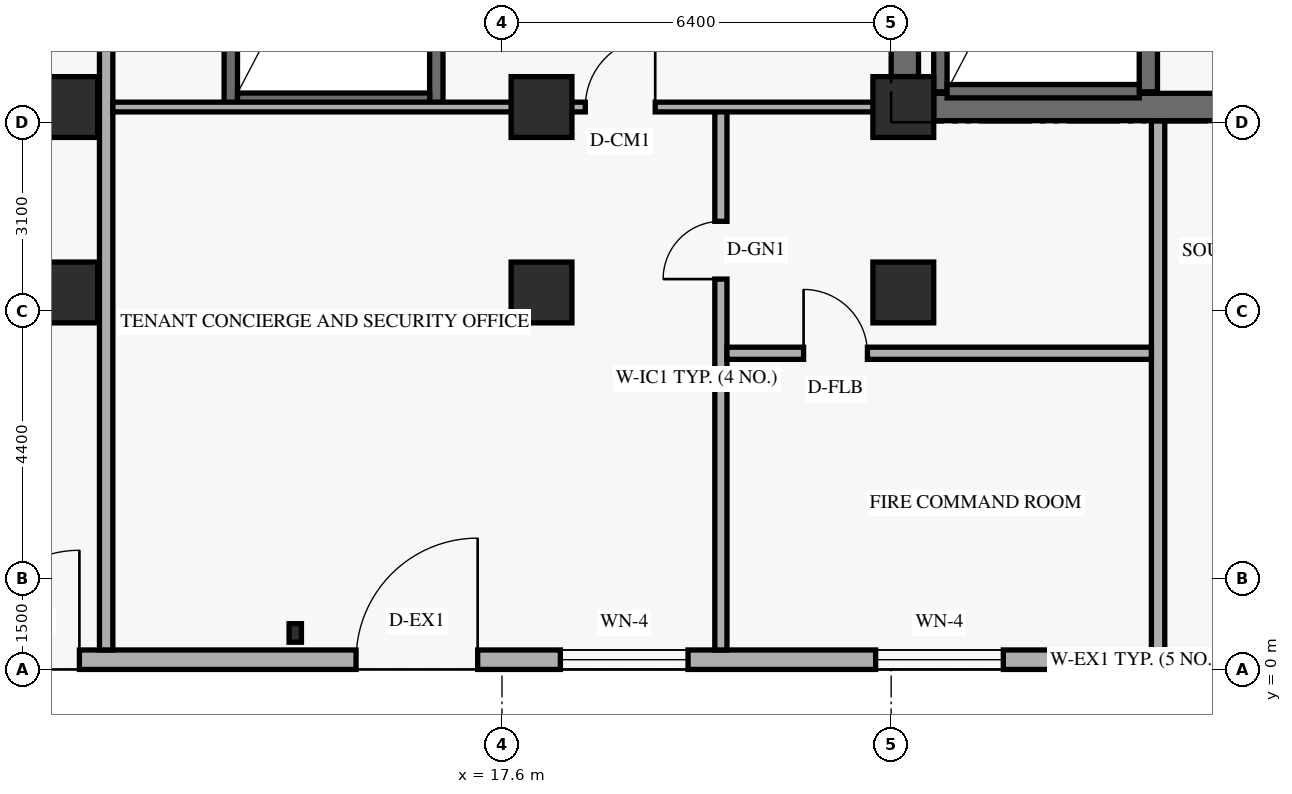
"""IFC4 building model, lengths in metres.
Left out: names, types, materials, properties, quantities, classifications, styles, units other than length and angle.
Written with IfcOpenShell. Run it as: python <this file> out.ifc"""

import sys

from ifc_helpers import new_model, si_unit, direction, frame, frame_2d, origin, origin_2d, place, context, subcontext, project, spatial, rectangle, hollow_rectangle, extrude, element, fill, save


model = new_model("IFC4")
c1 = context("Model", 3, precision=1e-05, world=origin(), true_north=direction((0.0, 1.0)))
c2 = subcontext(c1, "Body", "Model", "MODEL_VIEW")
j1 = project(units=[si_unit("LENGTHUNIT", "METRE"), si_unit("PLANEANGLEUNIT", "RADIAN")], contexts=[c1])
p1 = place(None, origin())
s1 = spatial("IfcSite", under=j1, at=p1, CompositionType="ELEMENT")
p2 = place(p1, origin())
s2 = spatial("IfcBuilding", under=s1, at=p2, CompositionType="ELEMENT")
p3 = place(p2, origin())
s3 = spatial("IfcBuildingStorey", under=s2, at=p3, CompositionType="ELEMENT", Elevation=0.0)
p4 = place(p3, frame((24.225, 9.75, 0.0), z_axis=(0.0, 0.0, 1.0), x_axis=(0.0, 1.0, 0.0)))
e1 = element("IfcWall", 1, at=p4, inside=s3, PredefinedType="SHEAR", context=c2, shape_type="SweptSolid", body=[
    extrude(rectangle(XDim=7.3, YDim=0.45, at=frame_2d((3.65, 0.0))), origin(), (0.0, 0.0, 1.0), 3.539),
])
p5 = place(p3, frame((24.7, 9.25, 0.0), z_axis=(0.0, 0.0, 1.0), x_axis=(1.0, 0.0, 0.0)))
e2 = element("IfcWall", 2, at=p5, inside=s3, PredefinedType="SHEAR", context=c2, shape_type="SweptSolid", body=[
    extrude(rectangle(XDim=10.0, YDim=0.45, at=frame_2d((5.0, 0.0))), origin(), (0.0, 0.0, 1.0), 4.39),
])
p6 = place(p5, frame((5.2, 0.0, 0.0)))
e3 = element("IfcOpeningElement", 3, at=p6, cuts=e2, PredefinedType="OPENING", context=c2, shape_type="SweptSolid", body=[
    extrude(rectangle(XDim=1.1, YDim=2.15, at=frame_2d((0.55, 1.075))), frame((0.0, 0.235, 0.0), z_axis=(0.0, -1.0, 0.0), x_axis=(1.0, 0.0, 0.0)), (0.0, 0.0, 1.0), 0.47),
])
p7 = place(p3, frame((24.81, 9.5, 0.0), z_axis=(0.0, 0.0, 1.0), x_axis=(0.0, 1.0, 0.0)))
e4 = element("IfcWall", 4, at=p7, inside=s3, PredefinedType="SHEAR", context=c2, shape_type="SweptSolid", body=[
    extrude(rectangle(XDim=7.76, YDim=0.22, at=frame_2d((3.88, 0.0))), origin(), (0.0, 0.0, 1.0), 4.39),
])
p8 = place(p3, frame((28.23, 9.5, 0.0), z_axis=(0.0, 0.0, 1.0), x_axis=(0.0, 1.0, 0.0)))
e5 = element("IfcWall", 5, at=p8, inside=s3, PredefinedType="SHEAR", context=c2, shape_type="SweptSolid", body=[
    extrude(rectangle(XDim=7.76, YDim=0.3, at=frame_2d((3.88, 0.0))), origin(), (0.0, 0.0, 1.0), 4.39),
])
p9 = place(p3, frame((24.92, 9.51, 0.0), z_axis=(0.0, 0.0, 1.0), x_axis=(1.0, 0.0, 0.0)))
e6 = element("IfcWall", 6, at=p9, inside=s3, PredefinedType="SHEAR", context=c2, shape_type="SweptSolid", body=[
    extrude(rectangle(XDim=3.16, YDim=0.22, at=frame_2d((1.58, 0.0))), origin(), (0.0, 0.0, 1.0), 4.39),
])
for number, where, z_axis, x_axis in (
    (7, (13.14, 9.26, 0.0), (0.0, 0.0, 1.0), (0.0, 1.0, 0.0)),
    (8, (16.52, 9.26, 0.0), (0.0, 0.0, 1.0), (0.0, 1.0, 0.0)),
):
    element("IfcWall", number, at=place(p3, frame(where, z_axis=z_axis, x_axis=x_axis)), inside=s3, PredefinedType="SHEAR", context=c2, shape_type="SweptSolid", body=[
        extrude(rectangle(XDim=7.98, YDim=0.22, at=frame_2d((3.99, 0.0))), origin(), (0.0, 0.0, 1.0), 4.39),
    ])
p10 = place(p3, frame((13.25, 9.37, 0.0), z_axis=(0.0, 0.0, 1.0), x_axis=(1.0, 0.0, 0.0)))
e9 = element("IfcWall", 9, at=p10, inside=s3, PredefinedType="SHEAR", context=c2, shape_type="SweptSolid", body=[
    extrude(rectangle(XDim=3.16, YDim=0.22, at=frame_2d((1.58, 0.0))), origin(), (0.0, 0.0, 1.0), 4.39),
])
for number, where, z_axis, x_axis in (
    (10, (10.45, 6.2, 0.0), (0.0, 0.0, 1.0), (1.0, 0.0, 0.0)),
    (11, (10.45, 9.25, 0.0), (0.0, 0.0, 1.0), (1.0, 0.0, 0.0)),
    (12, (18.25, 6.2, 0.0), (0.0, 0.0, 1.0), (1.0, 0.0, 0.0)),
    (13, (18.25, 9.25, 0.0), (0.0, 0.0, 1.0), (1.0, 0.0, 0.0)),
    (14, (24.2, 6.2, 0.0), (0.0, 0.0, 1.0), (1.0, 0.0, 0.0)),
    (15, (24.2, 9.25, 0.0), (0.0, 0.0, 1.0), (1.0, 0.0, 0.0)),
):
    element("IfcColumn", number, at=place(p3, frame(where, z_axis=z_axis, x_axis=x_axis)), inside=s3, PredefinedType="COLUMN", context=c2, shape_type="SweptSolid", body=[
        extrude(rectangle(XDim=1.0, YDim=1.0, at=origin_2d()), origin(), (0.0, 0.0, 1.0), 4.8),
    ])
p11 = place(p3, frame((14.2, 0.6, 0.0), z_axis=(0.0, 0.0, 1.0), x_axis=(1.0, 0.0, 0.0)))
e16 = element("IfcColumn", 16, at=p11, inside=s3, PredefinedType="PILASTER", context=c2, shape_type="SweptSolid", body=[
    extrude(hollow_rectangle(XDim=0.203, YDim=0.305, WallThickness=0.013, at=origin_2d()), origin(), (0.0, 0.0, 1.0), 4.39),
])
p12 = place(p3, frame((0.0, 0.16, 0.0), z_axis=(0.0, 0.0, 1.0), x_axis=(1.0, 0.0, 0.0)))
e17 = element("IfcWall", 17, at=p12, inside=s3, PredefinedType="SOLIDWALL", context=c2, shape_type="SweptSolid", body=[
    extrude(rectangle(XDim=56.0, YDim=0.32, at=frame_2d((28.0, 0.0))), origin(), (0.0, 0.0, 1.0), 4.39),
])
p13 = place(p12, frame((8.85, 0.0, 0.0)))
e18 = element("IfcOpeningElement", 18, at=p13, cuts=e17, PredefinedType="OPENING", context=c2, shape_type="SweptSolid", body=[
    extrude(rectangle(XDim=1.8, YDim=2.25, at=frame_2d((0.9, 1.125))), frame((0.0, 0.17, 0.0), z_axis=(0.0, -1.0, 0.0), x_axis=(1.0, 0.0, 0.0)), (0.0, 0.0, 1.0), 0.34),
])
p14 = place(p12, frame((15.2, 0.0, 0.0)))
e19 = element("IfcOpeningElement", 19, at=p14, cuts=e17, PredefinedType="OPENING", context=c2, shape_type="SweptSolid", body=[
    extrude(rectangle(XDim=2.0, YDim=2.35, at=frame_2d((1.0, 1.175))), frame((0.0, 0.17, 0.0), z_axis=(0.0, -1.0, 0.0), x_axis=(1.0, 0.0, 0.0)), (0.0, 0.0, 1.0), 0.34),
])
p15 = place(p12, frame((29.6, 0.0, 0.0)))
e20 = element("IfcOpeningElement", 20, at=p15, cuts=e17, PredefinedType="OPENING", context=c2, shape_type="SweptSolid", body=[
    extrude(rectangle(XDim=1.8, YDim=2.25, at=frame_2d((0.9, 1.125))), frame((0.0, 0.17, 0.0), z_axis=(0.0, -1.0, 0.0), x_axis=(1.0, 0.0, 0.0)), (0.0, 0.0, 1.0), 0.34),
])
p16 = place(p12, frame((3.04, 0.0, 0.85)))
e21 = element("IfcOpeningElement", 21, at=p16, cuts=e17, PredefinedType="OPENING", context=c2, shape_type="SweptSolid", body=[
    extrude(rectangle(XDim=2.1, YDim=1.75, at=frame_2d((1.05, 0.875))), frame((0.0, 0.17, 0.0), z_axis=(0.0, -1.0, 0.0), x_axis=(1.0, 0.0, 0.0)), (0.0, 0.0, 1.0), 0.34),
])
p17 = place(p12, frame((18.56, 0.0, 0.85)))
e22 = element("IfcOpeningElement", 22, at=p17, cuts=e17, PredefinedType="OPENING", context=c2, shape_type="SweptSolid", body=[
    extrude(rectangle(XDim=2.1, YDim=1.75, at=frame_2d((1.05, 0.875))), frame((0.0, 0.17, 0.0), z_axis=(0.0, -1.0, 0.0), x_axis=(1.0, 0.0, 0.0)), (0.0, 0.0, 1.0), 0.34),
])
p18 = place(p12, frame((23.745, 0.0, 0.85)))
e23 = element("IfcOpeningElement", 23, at=p18, cuts=e17, PredefinedType="OPENING", context=c2, shape_type="SweptSolid", body=[
    extrude(rectangle(XDim=2.1, YDim=1.75, at=frame_2d((1.05, 0.875))), frame((0.0, 0.17, 0.0), z_axis=(0.0, -1.0, 0.0), x_axis=(1.0, 0.0, 0.0)), (0.0, 0.0, 1.0), 0.34),
])
p19 = place(p12, frame((37.275, 0.0, 0.85)))
e24 = element("IfcOpeningElement", 24, at=p19, cuts=e17, PredefinedType="OPENING", context=c2, shape_type="SweptSolid", body=[
    extrude(rectangle(XDim=2.1, YDim=1.75, at=frame_2d((1.05, 0.875))), frame((0.0, 0.17, 0.0), z_axis=(0.0, -1.0, 0.0), x_axis=(1.0, 0.0, 0.0)), (0.0, 0.0, 1.0), 0.34),
])
p20 = place(p12, frame((48.95, 0.0, 0.85)))
e25 = element("IfcOpeningElement", 25, at=p20, cuts=e17, PredefinedType="OPENING", context=c2, shape_type="SweptSolid", body=[
    extrude(rectangle(XDim=2.1, YDim=1.75, at=frame_2d((1.05, 0.875))), frame((0.0, 0.17, 0.0), z_axis=(0.0, -1.0, 0.0), x_axis=(1.0, 0.0, 0.0)), (0.0, 0.0, 1.0), 0.34),
])
p21 = place(p3, frame((11.09, 0.32, 0.0), z_axis=(0.0, 0.0, 1.0), x_axis=(0.0, 1.0, 0.0)))
e26 = element("IfcWall", 26, at=p21, inside=s3, PredefinedType="STANDARD", context=c2, shape_type="SweptSolid", body=[
    extrude(rectangle(XDim=16.81, YDim=0.22, at=frame_2d((8.405, 0.0))), origin(), (0.0, 0.0, 1.0), 3.761),
])
p22 = place(p3, frame((28.39, 0.32, 0.0), z_axis=(0.0, 0.0, 1.0), x_axis=(0.0, 1.0, 0.0)))
e27 = element("IfcWall", 27, at=p22, inside=s3, PredefinedType="STANDARD", context=c2, shape_type="SweptSolid", body=[
    extrude(rectangle(XDim=8.705, YDim=0.22, at=frame_2d((4.353, 0.0))), origin(), (0.0, 0.0, 1.0), 3.761),
])
p23 = place(p3, frame((21.2, 0.32, 0.0), z_axis=(0.0, 0.0, 1.0), x_axis=(0.0, 1.0, 0.0)))
e28 = element("IfcWall", 28, at=p23, inside=s3, PredefinedType="STANDARD", context=c2, shape_type="SweptSolid", body=[
    extrude(rectangle(XDim=8.93, YDim=0.2, at=frame_2d((4.465, 0.0))), origin(), (0.0, 0.0, 1.0), 3.272),
])
p24 = place(p23, frame((6.1, 0.0, 0.0)))
e29 = element("IfcOpeningElement", 29, at=p24, cuts=e28, PredefinedType="OPENING", context=c2, shape_type="SweptSolid", body=[
    extrude(rectangle(XDim=0.95, YDim=2.15, at=frame_2d((0.475, 1.075))), frame((0.0, 0.11, 0.0), z_axis=(0.0, -1.0, 0.0), x_axis=(1.0, 0.0, 0.0)), (0.0, 0.0, 1.0), 0.22),
])
p25 = place(p3, frame((21.3, 5.2, 0.0), z_axis=(0.0, 0.0, 1.0), x_axis=(1.0, 0.0, 0.0)))
e30 = element("IfcWall", 30, at=p25, inside=s3, PredefinedType="STANDARD", context=c2, shape_type="SweptSolid", body=[
    extrude(rectangle(XDim=6.98, YDim=0.2, at=frame_2d((3.49, 0.0))), origin(), (0.0, 0.0, 1.0), 4.39),
])
p26 = place(p25, frame((1.26, 0.0, 0.0)))
e31 = element("IfcOpeningElement", 31, at=p26, cuts=e30, PredefinedType="OPENING", context=c2, shape_type="SweptSolid", body=[
    extrude(rectangle(XDim=1.05, YDim=2.15, at=frame_2d((0.525, 1.075))), frame((0.0, 0.11, 0.0), z_axis=(0.0, -1.0, 0.0), x_axis=(1.0, 0.0, 0.0)), (0.0, 0.0, 1.0), 0.22),
])
p27 = place(p3, frame((11.2, 9.25, 0.0), z_axis=(0.0, 0.0, 1.0), x_axis=(1.0, 0.0, 0.0)))
e32 = element("IfcWall", 32, at=p27, inside=s3, PredefinedType="PARTITIONING", context=c2, shape_type="SweptSolid", body=[
    extrude(rectangle(XDim=12.8, YDim=0.16, at=frame_2d((6.4, 0.0))), origin(), (0.0, 0.0, 1.0), 3.272),
])
p28 = place(p27, frame((7.77, 0.0, 0.0)))
e33 = element("IfcOpeningElement", 33, at=p28, cuts=e32, PredefinedType="OPENING", context=c2, shape_type="SweptSolid", body=[
    extrude(rectangle(XDim=1.15, YDim=2.15, at=frame_2d((0.575, 1.075))), frame((0.0, 0.09, 0.0), z_axis=(0.0, -1.0, 0.0), x_axis=(1.0, 0.0, 0.0)), (0.0, 0.0, 1.0), 0.18),
])
p29 = place(p13, frame((1.8, 0.0, 0.0), z_axis=(0.0, 0.0, 1.0), x_axis=(-1.0, 0.0, 0.0)))
e34 = element("IfcDoor", 34, at=p29, inside=s3, OperationType="SINGLE_SWING_LEFT", PredefinedType="DOOR", context=c2, shape_type="SweptSolid", body=[
    extrude(rectangle(XDim=1.8, YDim=2.25, at=frame_2d((0.9, 1.125))), frame((0.0, 0.025, 0.0), z_axis=(0.0, -1.0, 0.0), x_axis=(1.0, 0.0, 0.0)), (0.0, 0.0, 1.0), 0.05),
])
fill(e18, e34)
p30 = place(p14, frame((2.0, 0.0, 0.0), z_axis=(0.0, 0.0, 1.0), x_axis=(-1.0, 0.0, 0.0)))
e35 = element("IfcDoor", 35, at=p30, inside=s3, OperationType="SINGLE_SWING_LEFT", PredefinedType="DOOR", context=c2, shape_type="SweptSolid", body=[
    extrude(rectangle(XDim=2.0, YDim=2.35, at=frame_2d((1.0, 1.175))), frame((0.0, 0.025, 0.0), z_axis=(0.0, -1.0, 0.0), x_axis=(1.0, 0.0, 0.0)), (0.0, 0.0, 1.0), 0.05),
])
fill(e19, e35)
p31 = place(p17, origin())
e36 = element("IfcWindow", 36, at=p31, inside=s3, PartitioningType="SINGLE_PANEL", PredefinedType="WINDOW", context=c2, shape_type="SweptSolid", body=[
    extrude(rectangle(XDim=2.1, YDim=1.75, at=frame_2d((1.05, 0.875))), frame((0.0, 0.03, 0.0), z_axis=(0.0, -1.0, 0.0), x_axis=(1.0, 0.0, 0.0)), (0.0, 0.0, 1.0), 0.06),
])
fill(e22, e36)
p32 = place(p18, origin())
e37 = element("IfcWindow", 37, at=p32, inside=s3, PartitioningType="SINGLE_PANEL", PredefinedType="WINDOW", context=c2, shape_type="SweptSolid", body=[
    extrude(rectangle(XDim=2.1, YDim=1.75, at=frame_2d((1.05, 0.875))), frame((0.0, 0.03, 0.0), z_axis=(0.0, -1.0, 0.0), x_axis=(1.0, 0.0, 0.0)), (0.0, 0.0, 1.0), 0.06),
])
fill(e23, e37)
p33 = place(p26, origin())
e38 = element("IfcDoor", 38, at=p33, inside=s3, OperationType="SINGLE_SWING_LEFT", PredefinedType="DOOR", context=c2, shape_type="SweptSolid", body=[
    extrude(rectangle(XDim=1.05, YDim=2.15, at=frame_2d((0.525, 1.075))), frame((0.0, 0.025, 0.0), z_axis=(0.0, -1.0, 0.0), x_axis=(1.0, 0.0, 0.0)), (0.0, 0.0, 1.0), 0.05),
])
fill(e31, e38)
p34 = place(p28, origin())
e39 = element("IfcDoor", 39, at=p34, inside=s3, OperationType="SINGLE_SWING_RIGHT", PredefinedType="DOOR", context=c2, shape_type="SweptSolid", body=[
    extrude(rectangle(XDim=1.15, YDim=2.15, at=frame_2d((0.575, 1.075))), frame((0.0, 0.025, 0.0), z_axis=(0.0, -1.0, 0.0), x_axis=(1.0, 0.0, 0.0)), (0.0, 0.0, 1.0), 0.05),
])
fill(e33, e39)
p35 = place(p24, origin())
e40 = element("IfcDoor", 40, at=p35, inside=s3, OperationType="SINGLE_SWING_LEFT", PredefinedType="DOOR", context=c2, shape_type="SweptSolid", body=[
    extrude(rectangle(XDim=0.95, YDim=2.15, at=frame_2d((0.475, 1.075))), frame((0.0, 0.025, 0.0), z_axis=(0.0, -1.0, 0.0), x_axis=(1.0, 0.0, 0.0)), (0.0, 0.0, 1.0), 0.05),
])
fill(e29, e40)
save(model, sys.argv[1])
